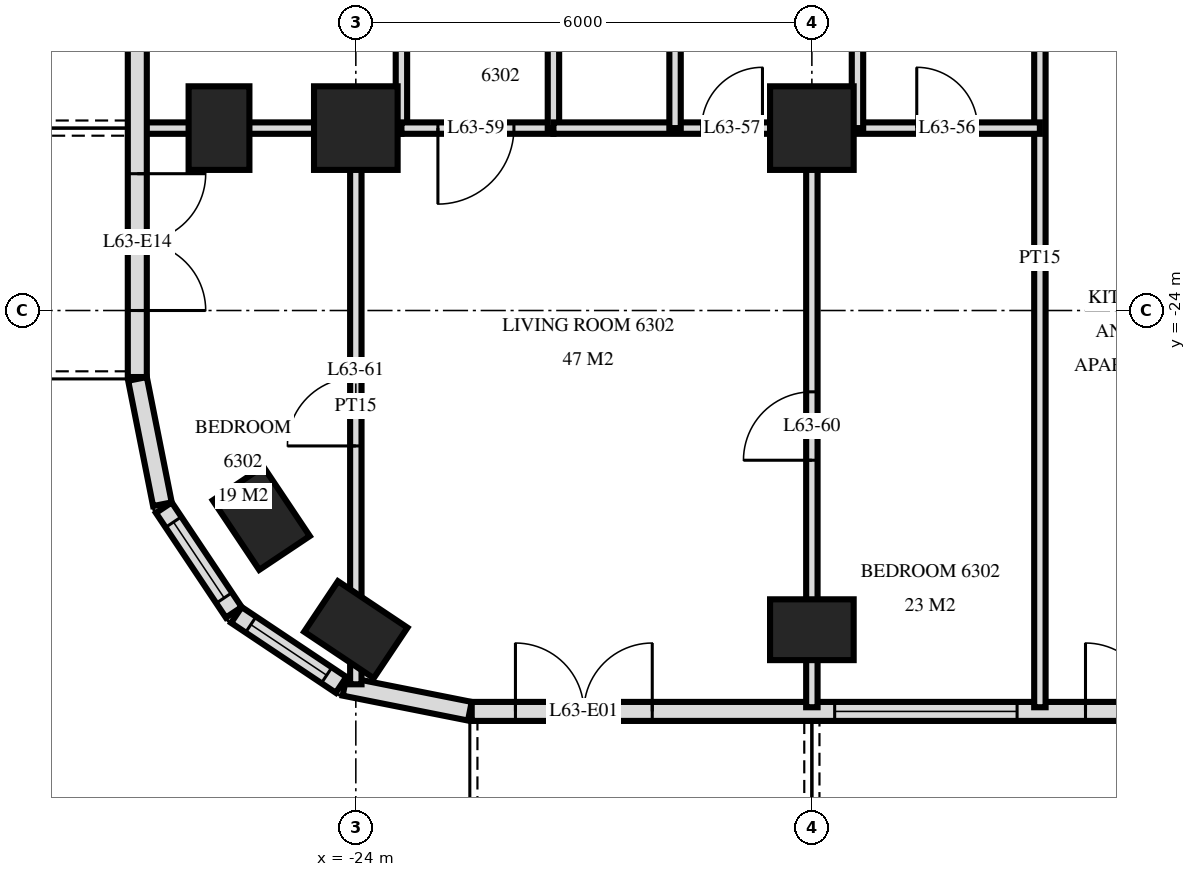
"""IFC4 building model, lengths in metres.
Left out: names, types, materials, properties, quantities, classifications, styles, units other than length and angle.
Written with IfcOpenShell. Run it as: python <this file> out.ifc"""

import sys

from ifc_helpers import new_model, si_unit, direction, frame, frame_2d, origin, origin_2d, place, context, subcontext, project, spatial, rectangle, extrude, element, fill, save


model = new_model("IFC4")
c1 = context("Model", 3, precision=1e-05, world=origin(), true_north=direction((0.0, 1.0)))
c2 = subcontext(c1, "Body", "Model", "MODEL_VIEW")
j1 = project(units=[si_unit("LENGTHUNIT", "METRE"), si_unit("PLANEANGLEUNIT", "RADIAN")], contexts=[c1])
p1 = place(None, origin())
s1 = spatial("IfcSite", under=j1, at=p1, CompositionType="ELEMENT")
p2 = place(p1, origin())
s2 = spatial("IfcBuilding", under=s1, at=p2, CompositionType="ELEMENT")
p3 = place(p2, frame((0.0, 0.0, 239.6)))
s3 = spatial("IfcBuildingStorey", under=s2, at=p3, CompositionType="ELEMENT", Elevation=239.6)
for number, where, z_axis, x_axis in (
    (1, (-25.8, -21.6, 0.0), (0.0, 0.0, 1.0), (0.0, 1.0, 0.0)),
    (2, (-25.244, -26.733, 0.0), (0.0, 0.0, 1.0), (-0.556, 0.831, 0.0)),
    (3, (-24.0, -28.2, 0.0), (0.0, 0.0, 1.0), (-0.831, 0.556, 0.0)),
):
    element("IfcColumn", number, at=place(p3, frame(where, z_axis=z_axis, x_axis=x_axis)), inside=s3, PredefinedType="COLUMN", context=c2, shape_type="SweptSolid", body=[
        extrude(rectangle(XDim=1.1, YDim=0.8, at=origin_2d()), origin(), (0.0, 0.0, 1.0), 3.5),
    ])
p4 = place(p3, frame((-24.0, -21.6, 0.0), z_axis=(0.0, 0.0, 1.0), x_axis=(1.0, 0.0, 0.0)))
e4 = element("IfcColumn", 4, at=p4, inside=s3, PredefinedType="COLUMN", context=c2, shape_type="SweptSolid", body=[
    extrude(rectangle(XDim=1.1, YDim=1.1, at=origin_2d()), origin(), (0.0, 0.0, 1.0), 3.5),
])
p5 = place(p3, frame((-18.0, -28.2, 0.0), z_axis=(0.0, 0.0, 1.0), x_axis=(1.0, 0.0, 0.0)))
e5 = element("IfcColumn", 5, at=p5, inside=s3, PredefinedType="COLUMN", context=c2, shape_type="SweptSolid", body=[
    extrude(rectangle(XDim=1.1, YDim=0.8, at=origin_2d()), origin(), (0.0, 0.0, 1.0), 3.5),
])
p6 = place(p3, frame((-18.0, -21.6, 0.0), z_axis=(0.0, 0.0, 1.0), x_axis=(1.0, 0.0, 0.0)))
e6 = element("IfcColumn", 6, at=p6, inside=s3, PredefinedType="COLUMN", context=c2, shape_type="SweptSolid", body=[
    extrude(rectangle(XDim=1.1, YDim=1.1, at=origin_2d()), origin(), (0.0, 0.0, 1.0), 3.5),
])
p7 = place(p3, frame((-26.875, -3.325, 0.0), z_axis=(0.0, 0.0, 1.0), x_axis=(0.0, -1.0, 0.0)))
e7 = element("IfcWall", 7, at=p7, inside=s3, PredefinedType="SOLIDWALL", context=c2, shape_type="SweptSolid", body=[
    extrude(rectangle(XDim=21.551, YDim=0.25, at=frame_2d((10.775, 0.0))), origin(), (0.0, 0.0, 1.0), 3.22),
])
p8 = place(p7, frame((7.525, 0.0, 0.0)))
e8 = element("IfcOpeningElement", 8, at=p8, cuts=e7, PredefinedType="OPENING", context=c2, shape_type="SweptSolid", body=[
    extrude(rectangle(XDim=1.8, YDim=2.4, at=frame_2d((0.9, 1.2))), frame((0.0, 0.135, 0.0), z_axis=(0.0, -1.0, 0.0), x_axis=(1.0, 0.0, 0.0)), (0.0, 0.0, 1.0), 0.27),
])
p9 = place(p7, frame((12.275, 0.0, 0.9)))
e9 = element("IfcOpeningElement", 9, at=p9, cuts=e7, PredefinedType="OPENING", context=c2, shape_type="SweptSolid", body=[
    extrude(rectangle(XDim=1.2, YDim=1.5, at=frame_2d((0.6, 0.75))), frame((0.0, 0.135, 0.0), z_axis=(0.0, -1.0, 0.0), x_axis=(1.0, 0.0, 0.0)), (0.0, 0.0, 1.0), 0.27),
])
p10 = place(p7, frame((15.275, 0.0, 0.0)))
e10 = element("IfcOpeningElement", 10, at=p10, cuts=e7, PredefinedType="OPENING", context=c2, shape_type="SweptSolid", body=[
    extrude(rectangle(XDim=1.8, YDim=2.4, at=frame_2d((0.9, 1.2))), frame((0.0, 0.135, 0.0), z_axis=(0.0, -1.0, 0.0), x_axis=(1.0, 0.0, 0.0)), (0.0, 0.0, 1.0), 0.27),
])
p11 = place(p7, frame((18.875, 0.0, 0.0)))
e11 = element("IfcOpeningElement", 11, at=p11, cuts=e7, PredefinedType="OPENING", context=c2, shape_type="SweptSolid", body=[
    extrude(rectangle(XDim=1.8, YDim=2.4, at=frame_2d((0.9, 1.2))), frame((0.0, 0.135, 0.0), z_axis=(0.0, -1.0, 0.0), x_axis=(1.0, 0.0, 0.0)), (0.0, 0.0, 1.0), 0.27),
])
p12 = place(p3, frame((-26.873, -24.9, 0.0), z_axis=(0.0, 0.0, 1.0), x_axis=(0.195026884138, -0.980797896849, 0.0)))
e12 = element("IfcWall", 12, at=p12, inside=s3, PredefinedType="SOLIDWALL", context=c2, shape_type="SweptSolid", body=[
    extrude(rectangle(XDim=1.681, YDim=0.25, at=frame_2d((0.841, 0.0))), origin(), (0.0, 0.0, 1.0), 3.22),
])
p13 = place(p3, frame((-26.526, -26.594, 0.0), z_axis=(0.0, 0.0, 1.0), x_axis=(0.55555029066, -0.831482937015, 0.0)))
e13 = element("IfcWall", 13, at=p13, inside=s3, PredefinedType="SOLIDWALL", context=c2, shape_type="SweptSolid", body=[
    extrude(rectangle(XDim=1.656, YDim=0.25, at=frame_2d((0.828, 0.0))), origin(), (0.0, 0.0, 1.0), 3.22),
])
p14 = place(p13, frame((0.228, 0.0, 0.9)))
e14 = element("IfcOpeningElement", 14, at=p14, cuts=e13, PredefinedType="OPENING", context=c2, shape_type="SweptSolid", body=[
    extrude(rectangle(XDim=1.2, YDim=1.5, at=frame_2d((0.6, 0.75))), frame((0.0, 0.135, 0.0), z_axis=(0.0, -1.0, 0.0), x_axis=(1.0, 0.0, 0.0)), (0.0, 0.0, 1.0), 0.27),
])
p15 = place(p3, frame((-25.571, -28.006, 0.0), z_axis=(0.0, 0.0, 1.0), x_axis=(0.831482937015, -0.55555029066, 0.0)))
e15 = element("IfcWall", 15, at=p15, inside=s3, PredefinedType="SOLIDWALL", context=c2, shape_type="SweptSolid", body=[
    extrude(rectangle(XDim=1.656, YDim=0.25, at=frame_2d((0.828, 0.0))), origin(), (0.0, 0.0, 1.0), 3.22),
])
p16 = place(p15, frame((0.228, 0.0, 0.9)))
e16 = element("IfcOpeningElement", 16, at=p16, cuts=e15, PredefinedType="OPENING", context=c2, shape_type="SweptSolid", body=[
    extrude(rectangle(XDim=1.2, YDim=1.5, at=frame_2d((0.6, 0.75))), frame((0.0, 0.135, 0.0), z_axis=(0.0, -1.0, 0.0), x_axis=(1.0, 0.0, 0.0)), (0.0, 0.0, 1.0), 0.27),
])
p17 = place(p3, frame((-24.149, -28.945, 0.0), z_axis=(0.0, 0.0, 1.0), x_axis=(0.980775640221, -0.19513878023, 0.0)))
e17 = element("IfcWall", 17, at=p17, inside=s3, PredefinedType="SOLIDWALL", context=c2, shape_type="SweptSolid", body=[
    extrude(rectangle(XDim=1.681, YDim=0.25, at=frame_2d((0.841, 0.0))), origin(), (0.0, 0.0, 1.0), 3.22),
])
p18 = place(p3, frame((-22.475, -29.275, 0.0), z_axis=(0.0, 0.0, 1.0), x_axis=(1.0, 0.0, 0.0)))
e18 = element("IfcWall", 18, at=p18, inside=s3, PredefinedType="SOLIDWALL", context=c2, shape_type="SweptSolid", body=[
    extrude(rectangle(XDim=44.951, YDim=0.25, at=frame_2d((22.475, 0.0))), origin(), (0.0, 0.0, 1.0), 3.22),
])
p19 = place(p18, frame((0.575, 0.0, 0.0)))
e19 = element("IfcOpeningElement", 19, at=p19, cuts=e18, PredefinedType="OPENING", context=c2, shape_type="SweptSolid", body=[
    extrude(rectangle(XDim=1.8, YDim=2.4, at=frame_2d((0.9, 1.2))), frame((0.0, 0.135, 0.0), z_axis=(0.0, -1.0, 0.0), x_axis=(1.0, 0.0, 0.0)), (0.0, 0.0, 1.0), 0.27),
])
p20 = place(p18, frame((4.775, 0.0, 0.9)))
e20 = element("IfcOpeningElement", 20, at=p20, cuts=e18, PredefinedType="OPENING", context=c2, shape_type="SweptSolid", body=[
    extrude(rectangle(XDim=2.4, YDim=1.5, at=frame_2d((1.2, 0.75))), frame((0.0, 0.135, 0.0), z_axis=(0.0, -1.0, 0.0), x_axis=(1.0, 0.0, 0.0)), (0.0, 0.0, 1.0), 0.27),
])
p21 = place(p18, frame((8.075, 0.0, 0.0)))
e21 = element("IfcOpeningElement", 21, at=p21, cuts=e18, PredefinedType="OPENING", context=c2, shape_type="SweptSolid", body=[
    extrude(rectangle(XDim=1.8, YDim=2.4, at=frame_2d((0.9, 1.2))), frame((0.0, 0.135, 0.0), z_axis=(0.0, -1.0, 0.0), x_axis=(1.0, 0.0, 0.0)), (0.0, 0.0, 1.0), 0.27),
])
p22 = place(p18, frame((11.075, 0.0, 0.0)))
e22 = element("IfcOpeningElement", 22, at=p22, cuts=e18, PredefinedType="OPENING", context=c2, shape_type="SweptSolid", body=[
    extrude(rectangle(XDim=1.8, YDim=2.4, at=frame_2d((0.9, 1.2))), frame((0.0, 0.135, 0.0), z_axis=(0.0, -1.0, 0.0), x_axis=(1.0, 0.0, 0.0)), (0.0, 0.0, 1.0), 0.27),
])
p23 = place(p18, frame((13.775, 0.0, 0.9)))
e23 = element("IfcOpeningElement", 23, at=p23, cuts=e18, PredefinedType="OPENING", context=c2, shape_type="SweptSolid", body=[
    extrude(rectangle(XDim=2.4, YDim=1.5, at=frame_2d((1.2, 0.75))), frame((0.0, 0.135, 0.0), z_axis=(0.0, -1.0, 0.0), x_axis=(1.0, 0.0, 0.0)), (0.0, 0.0, 1.0), 0.27),
])
p24 = place(p18, frame((16.775, 0.0, 0.9)))
e24 = element("IfcOpeningElement", 24, at=p24, cuts=e18, PredefinedType="OPENING", context=c2, shape_type="SweptSolid", body=[
    extrude(rectangle(XDim=2.4, YDim=1.5, at=frame_2d((1.2, 0.75))), frame((0.0, 0.135, 0.0), z_axis=(0.0, -1.0, 0.0), x_axis=(1.0, 0.0, 0.0)), (0.0, 0.0, 1.0), 0.27),
])
p25 = place(p18, frame((20.075, 0.0, 0.0)))
e25 = element("IfcOpeningElement", 25, at=p25, cuts=e18, PredefinedType="OPENING", context=c2, shape_type="SweptSolid", body=[
    extrude(rectangle(XDim=1.8, YDim=2.4, at=frame_2d((0.9, 1.2))), frame((0.0, 0.135, 0.0), z_axis=(0.0, -1.0, 0.0), x_axis=(1.0, 0.0, 0.0)), (0.0, 0.0, 1.0), 0.27),
])
p26 = place(p18, frame((23.075, 0.0, 0.0)))
e26 = element("IfcOpeningElement", 26, at=p26, cuts=e18, PredefinedType="OPENING", context=c2, shape_type="SweptSolid", body=[
    extrude(rectangle(XDim=1.8, YDim=2.4, at=frame_2d((0.9, 1.2))), frame((0.0, 0.135, 0.0), z_axis=(0.0, -1.0, 0.0), x_axis=(1.0, 0.0, 0.0)), (0.0, 0.0, 1.0), 0.27),
])
p27 = place(p18, frame((25.775, 0.0, 0.9)))
e27 = element("IfcOpeningElement", 27, at=p27, cuts=e18, PredefinedType="OPENING", context=c2, shape_type="SweptSolid", body=[
    extrude(rectangle(XDim=2.4, YDim=1.5, at=frame_2d((1.2, 0.75))), frame((0.0, 0.135, 0.0), z_axis=(0.0, -1.0, 0.0), x_axis=(1.0, 0.0, 0.0)), (0.0, 0.0, 1.0), 0.27),
])
p28 = place(p18, frame((29.075, 0.0, 0.0)))
e28 = element("IfcOpeningElement", 28, at=p28, cuts=e18, PredefinedType="OPENING", context=c2, shape_type="SweptSolid", body=[
    extrude(rectangle(XDim=1.8, YDim=2.4, at=frame_2d((0.9, 1.2))), frame((0.0, 0.135, 0.0), z_axis=(0.0, -1.0, 0.0), x_axis=(1.0, 0.0, 0.0)), (0.0, 0.0, 1.0), 0.27),
])
p29 = place(p18, frame((31.775, 0.0, 0.9)))
e29 = element("IfcOpeningElement", 29, at=p29, cuts=e18, PredefinedType="OPENING", context=c2, shape_type="SweptSolid", body=[
    extrude(rectangle(XDim=2.4, YDim=1.5, at=frame_2d((1.2, 0.75))), frame((0.0, 0.135, 0.0), z_axis=(0.0, -1.0, 0.0), x_axis=(1.0, 0.0, 0.0)), (0.0, 0.0, 1.0), 0.27),
])
p30 = place(p18, frame((35.075, 0.0, 0.0)))
e30 = element("IfcOpeningElement", 30, at=p30, cuts=e18, PredefinedType="OPENING", context=c2, shape_type="SweptSolid", body=[
    extrude(rectangle(XDim=1.8, YDim=2.4, at=frame_2d((0.9, 1.2))), frame((0.0, 0.135, 0.0), z_axis=(0.0, -1.0, 0.0), x_axis=(1.0, 0.0, 0.0)), (0.0, 0.0, 1.0), 0.27),
])
p31 = place(p18, frame((41.075, 0.0, 0.0)))
e31 = element("IfcOpeningElement", 31, at=p31, cuts=e18, PredefinedType="OPENING", context=c2, shape_type="SweptSolid", body=[
    extrude(rectangle(XDim=1.8, YDim=2.4, at=frame_2d((0.9, 1.2))), frame((0.0, 0.135, 0.0), z_axis=(0.0, -1.0, 0.0), x_axis=(1.0, 0.0, 0.0)), (0.0, 0.0, 1.0), 0.27),
])
p32 = place(p3, frame((-15.0, -29.22, 0.0), z_axis=(0.0, 0.0, 1.0), x_axis=(0.0, 1.0, 0.0)))
e32 = element("IfcWall", 32, at=p32, inside=s3, PredefinedType="PARTITIONING", context=c2, shape_type="SweptSolid", body=[
    extrude(rectangle(XDim=11.82, YDim=0.15, at=frame_2d((5.91, 0.0))), origin(), (0.0, 0.0, 1.0), 3.22),
])
p33 = place(p3, frame((-17.4, -21.6, 0.0), z_axis=(0.0, 0.0, 1.0), x_axis=(0.0, 1.0, 0.0)))
e33 = element("IfcWall", 33, at=p33, inside=s3, PredefinedType="PARTITIONING", context=c2, shape_type="SweptSolid", body=[
    extrude(rectangle(XDim=4.2, YDim=0.15, at=frame_2d((2.1, 0.0))), origin(), (0.0, 0.0, 1.0), 3.22),
])
p34 = place(p3, frame((-18.0, -29.22, 0.0), z_axis=(0.0, 0.0, 1.0), x_axis=(0.0, 1.0, 0.0)))
e34 = element("IfcWall", 34, at=p34, inside=s3, PredefinedType="PARTITIONING", context=c2, shape_type="SweptSolid", body=[
    extrude(rectangle(XDim=7.62, YDim=0.15, at=frame_2d((3.81, 0.0))), origin(), (0.0, 0.0, 1.0), 3.22),
])
p35 = place(p34, frame((3.25, 0.0, 0.0)))
e35 = element("IfcOpeningElement", 35, at=p35, cuts=e34, PredefinedType="OPENING", context=c2, shape_type="SweptSolid", body=[
    extrude(rectangle(XDim=0.9, YDim=2.1, at=frame_2d((0.45, 1.05))), frame((0.0, 0.085, 0.0), z_axis=(0.0, -1.0, 0.0), x_axis=(1.0, 0.0, 0.0)), (0.0, 0.0, 1.0), 0.17),
])
for number, where, z_axis, x_axis in (
    (36, (-19.8, -21.6, 0.0), (0.0, 0.0, 1.0), (0.0, 1.0, 0.0)),
    (37, (-21.4, -21.6, 0.0), (0.0, 0.0, 1.0), (0.0, 1.0, 0.0)),
):
    element("IfcWall", number, at=place(p3, frame(where, z_axis=z_axis, x_axis=x_axis)), inside=s3, PredefinedType="PARTITIONING", context=c2, shape_type="SweptSolid", body=[
        extrude(rectangle(XDim=4.2, YDim=0.15, at=frame_2d((2.1, 0.0))), origin(), (0.0, 0.0, 1.0), 3.22),
    ])
p36 = place(p3, frame((-23.4, -21.6, 0.0), z_axis=(0.0, 0.0, 1.0), x_axis=(0.0, 1.0, 0.0)))
e38 = element("IfcWall", 38, at=p36, inside=s3, PredefinedType="PARTITIONING", context=c2, shape_type="SweptSolid", body=[
    extrude(rectangle(XDim=4.2, YDim=0.15, at=frame_2d((2.1, 0.0))), origin(), (0.0, 0.0, 1.0), 3.22),
])
p37 = place(p36, frame((1.58, 0.0, 0.0)))
e39 = element("IfcOpeningElement", 39, at=p37, cuts=e38, PredefinedType="OPENING", context=c2, shape_type="SweptSolid", body=[
    extrude(rectangle(XDim=1.0, YDim=2.1, at=frame_2d((0.5, 1.05))), frame((0.0, 0.085, 0.0), z_axis=(0.0, -1.0, 0.0), x_axis=(1.0, 0.0, 0.0)), (0.0, 0.0, 1.0), 0.17),
])
p38 = place(p3, frame((-24.0, -28.918, 0.0), z_axis=(0.0, 0.0, 1.0), x_axis=(0.0, 1.0, 0.0)))
e40 = element("IfcWall", 40, at=p38, inside=s3, PredefinedType="PARTITIONING", context=c2, shape_type="SweptSolid", body=[
    extrude(rectangle(XDim=7.318, YDim=0.15, at=frame_2d((3.659, 0.0))), origin(), (0.0, 0.0, 1.0), 3.22),
])
p39 = place(p38, frame((3.136, 0.0, 0.0)))
e41 = element("IfcOpeningElement", 41, at=p39, cuts=e40, PredefinedType="OPENING", context=c2, shape_type="SweptSolid", body=[
    extrude(rectangle(XDim=0.9, YDim=2.1, at=frame_2d((0.45, 1.05))), frame((0.0, 0.085, 0.0), z_axis=(0.0, -1.0, 0.0), x_axis=(1.0, 0.0, 0.0)), (0.0, 0.0, 1.0), 0.17),
])
p40 = place(p3, frame((-23.4, -21.6, 0.0), z_axis=(0.0, 0.0, 1.0), x_axis=(1.0, 0.0, 0.0)))
e42 = element("IfcWall", 42, at=p40, inside=s3, PredefinedType="PARTITIONING", context=c2, shape_type="SweptSolid", body=[
    extrude(rectangle(XDim=2.0, YDim=0.15, at=frame_2d((1.0, 0.0))), origin(), (0.0, 0.0, 1.0), 3.22),
])
p41 = place(p40, frame((0.48, 0.0, 0.0)))
e43 = element("IfcOpeningElement", 43, at=p41, cuts=e42, PredefinedType="OPENING", context=c2, shape_type="SweptSolid", body=[
    extrude(rectangle(XDim=1.0, YDim=2.1, at=frame_2d((0.5, 1.05))), frame((0.0, 0.085, 0.0), z_axis=(0.0, -1.0, 0.0), x_axis=(1.0, 0.0, 0.0)), (0.0, 0.0, 1.0), 0.17),
])
p42 = place(p3, frame((-26.82, -21.6, 0.0), z_axis=(0.0, 0.0, 1.0), x_axis=(1.0, 0.0, 0.0)))
e44 = element("IfcWall", 44, at=p42, inside=s3, PredefinedType="PARTITIONING", context=c2, shape_type="SweptSolid", body=[
    extrude(rectangle(XDim=3.42, YDim=0.15, at=frame_2d((1.71, 0.0))), origin(), (0.0, 0.0, 1.0), 3.22),
])
p43 = place(p3, frame((-21.4, -21.6, 0.0), z_axis=(0.0, 0.0, 1.0), x_axis=(1.0, 0.0, 0.0)))
e45 = element("IfcWall", 45, at=p43, inside=s3, PredefinedType="PARTITIONING", context=c2, shape_type="SweptSolid", body=[
    extrude(rectangle(XDim=6.4, YDim=0.15, at=frame_2d((3.2, 0.0))), origin(), (0.0, 0.0, 1.0), 3.22),
])
p44 = place(p43, frame((4.78, 0.0, 0.0)))
e46 = element("IfcOpeningElement", 46, at=p44, cuts=e45, PredefinedType="OPENING", context=c2, shape_type="SweptSolid", body=[
    extrude(rectangle(XDim=0.8, YDim=2.1, at=frame_2d((0.4, 1.05))), frame((0.0, 0.085, 0.0), z_axis=(0.0, -1.0, 0.0), x_axis=(1.0, 0.0, 0.0)), (0.0, 0.0, 1.0), 0.17),
])
p45 = place(p43, frame((1.95, 0.0, 0.0)))
e47 = element("IfcOpeningElement", 47, at=p45, cuts=e45, PredefinedType="OPENING", context=c2, shape_type="SweptSolid", body=[
    extrude(rectangle(XDim=0.8, YDim=2.1, at=frame_2d((0.4, 1.05))), frame((0.0, 0.085, 0.0), z_axis=(0.0, -1.0, 0.0), x_axis=(1.0, 0.0, 0.0)), (0.0, 0.0, 1.0), 0.17),
])
p46 = place(p14, origin())
e48 = element("IfcWindow", 48, at=p46, inside=s3, PartitioningType="SINGLE_PANEL", PredefinedType="WINDOW", context=c2, shape_type="SweptSolid", body=[
    extrude(rectangle(XDim=1.2, YDim=1.5, at=frame_2d((0.6, 0.75))), frame((0.0, 0.03, 0.0), z_axis=(0.0, -1.0, 0.0), x_axis=(1.0, 0.0, 0.0)), (0.0, 0.0, 1.0), 0.06),
])
fill(e14, e48)
p47 = place(p16, origin())
e49 = element("IfcWindow", 49, at=p47, inside=s3, PartitioningType="SINGLE_PANEL", PredefinedType="WINDOW", context=c2, shape_type="SweptSolid", body=[
    extrude(rectangle(XDim=1.2, YDim=1.5, at=frame_2d((0.6, 0.75))), frame((0.0, 0.03, 0.0), z_axis=(0.0, -1.0, 0.0), x_axis=(1.0, 0.0, 0.0)), (0.0, 0.0, 1.0), 0.06),
])
fill(e16, e49)
p48 = place(p19, origin())
e50 = element("IfcDoor", 50, at=p48, inside=s3, OperationType="DOUBLE_DOOR_SINGLE_SWING", PredefinedType="DOOR", context=c2, shape_type="SweptSolid", body=[
    extrude(rectangle(XDim=1.8, YDim=2.4, at=frame_2d((0.9, 1.2))), frame((0.0, 0.025, 0.0), z_axis=(0.0, -1.0, 0.0), x_axis=(1.0, 0.0, 0.0)), (0.0, 0.0, 1.0), 0.05),
])
fill(e19, e50)
p49 = place(p20, origin())
e51 = element("IfcWindow", 51, at=p49, inside=s3, PartitioningType="SINGLE_PANEL", PredefinedType="WINDOW", context=c2, shape_type="SweptSolid", body=[
    extrude(rectangle(XDim=2.4, YDim=1.5, at=frame_2d((1.2, 0.75))), frame((0.0, 0.03, 0.0), z_axis=(0.0, -1.0, 0.0), x_axis=(1.0, 0.0, 0.0)), (0.0, 0.0, 1.0), 0.06),
])
fill(e20, e51)
p50 = place(p21, origin())
e52 = element("IfcDoor", 52, at=p50, inside=s3, OperationType="DOUBLE_DOOR_SINGLE_SWING", PredefinedType="DOOR", context=c2, shape_type="SweptSolid", body=[
    extrude(rectangle(XDim=1.8, YDim=2.4, at=frame_2d((0.9, 1.2))), frame((0.0, 0.025, 0.0), z_axis=(0.0, -1.0, 0.0), x_axis=(1.0, 0.0, 0.0)), (0.0, 0.0, 1.0), 0.05),
])
fill(e21, e52)
p51 = place(p11, origin())
e53 = element("IfcDoor", 53, at=p51, inside=s3, OperationType="DOUBLE_DOOR_SINGLE_SWING", PredefinedType="DOOR", context=c2, shape_type="SweptSolid", body=[
    extrude(rectangle(XDim=1.8, YDim=2.4, at=frame_2d((0.9, 1.2))), frame((0.0, 0.025, 0.0), z_axis=(0.0, -1.0, 0.0), x_axis=(1.0, 0.0, 0.0)), (0.0, 0.0, 1.0), 0.05),
])
fill(e11, e53)
p52 = place(p44, origin())
e54 = element("IfcDoor", 54, at=p52, inside=s3, OperationType="SINGLE_SWING_RIGHT", PredefinedType="DOOR", context=c2, shape_type="SweptSolid", body=[
    extrude(rectangle(XDim=0.8, YDim=2.1, at=frame_2d((0.4, 1.05))), frame((0.0, 0.025, 0.0), z_axis=(0.0, -1.0, 0.0), x_axis=(1.0, 0.0, 0.0)), (0.0, 0.0, 1.0), 0.05),
])
fill(e46, e54)
p53 = place(p45, origin())
e55 = element("IfcDoor", 55, at=p53, inside=s3, OperationType="SINGLE_SWING_LEFT", PredefinedType="DOOR", context=c2, shape_type="SweptSolid", body=[
    extrude(rectangle(XDim=0.8, YDim=2.1, at=frame_2d((0.4, 1.05))), frame((0.0, 0.025, 0.0), z_axis=(0.0, -1.0, 0.0), x_axis=(1.0, 0.0, 0.0)), (0.0, 0.0, 1.0), 0.05),
])
fill(e47, e55)
p54 = place(p41, frame((0.5, 0.0, 0.0), z_axis=(0.0, 0.0, 1.0), x_axis=(-1.0, 0.0, 0.0)))
e56 = element("IfcDoor", 56, at=p54, inside=s3, OperationType="SINGLE_SWING_LEFT", PredefinedType="DOOR", context=c2, shape_type="SweptSolid", body=[
    extrude(rectangle(XDim=1.0, YDim=2.1, at=frame_2d((0.0, 1.05))), frame((0.0, -0.025, 0.0), z_axis=(0.0, 1.0, 0.0), x_axis=(-1.0, 0.0, 0.0)), (0.0, 0.0, 1.0), 0.05),
])
fill(e43, e56)
p55 = place(p35, origin())
e57 = element("IfcDoor", 57, at=p55, inside=s3, OperationType="SINGLE_SWING_RIGHT", PredefinedType="DOOR", context=c2, shape_type="SweptSolid", body=[
    extrude(rectangle(XDim=0.9, YDim=2.1, at=frame_2d((0.45, 1.05))), frame((0.0, 0.025, 0.0), z_axis=(0.0, -1.0, 0.0), x_axis=(1.0, 0.0, 0.0)), (0.0, 0.0, 1.0), 0.05),
])
fill(e35, e57)
p56 = place(p39, origin())
e58 = element("IfcDoor", 58, at=p56, inside=s3, OperationType="SINGLE_SWING_RIGHT", PredefinedType="DOOR", context=c2, shape_type="SweptSolid", body=[
    extrude(rectangle(XDim=0.9, YDim=2.1, at=frame_2d((0.45, 1.05))), frame((0.0, 0.025, 0.0), z_axis=(0.0, -1.0, 0.0), x_axis=(1.0, 0.0, 0.0)), (0.0, 0.0, 1.0), 0.05),
])
fill(e41, e58)
save(model, sys.argv[1])
